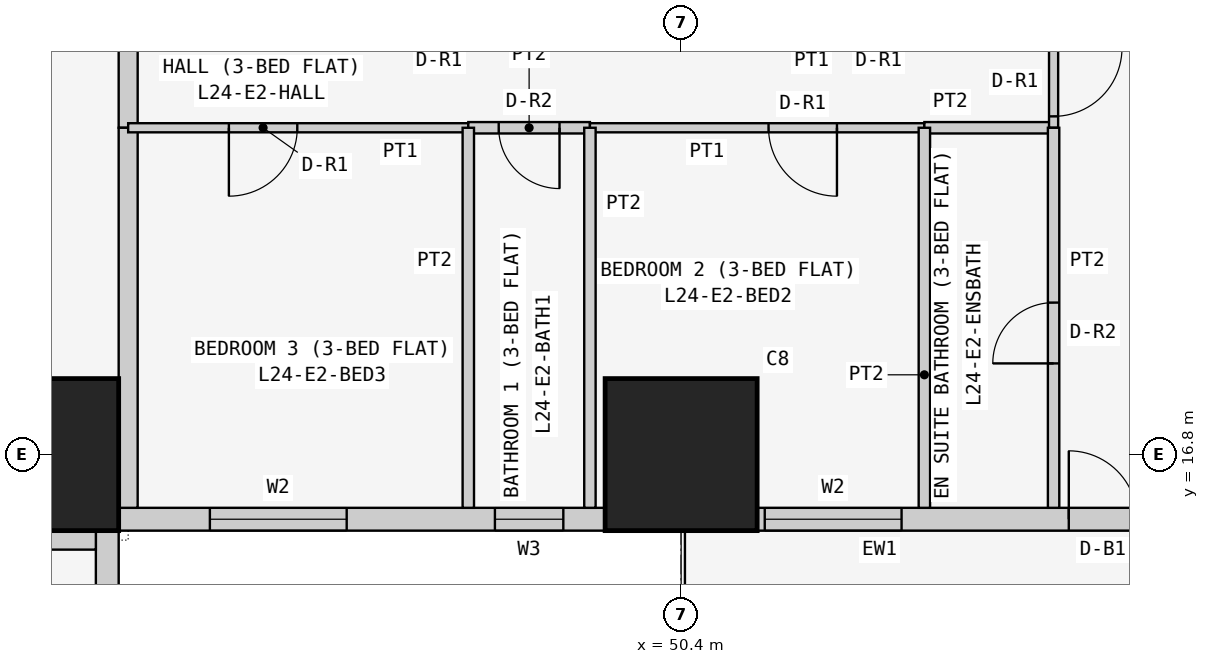
"""IFC4 building model, lengths in metres.
Left out: names, types, materials, properties, quantities, classifications, styles, units other than length and angle.
Written with IfcOpenShell. Run it as: python <this file> out.ifc"""

import sys

from ifc_helpers import new_model, si_unit, direction, frame, frame_2d, origin, origin_2d, place, context, subcontext, project, spatial, rectangle, extrude, element, fill, save


model = new_model("IFC4")
c1 = context("Model", 3, precision=1e-05, world=origin(), true_north=direction((0.0, 1.0)))
c2 = subcontext(c1, "Body", "Model", "MODEL_VIEW")
j1 = project(units=[si_unit("LENGTHUNIT", "METRE"), si_unit("PLANEANGLEUNIT", "RADIAN")], contexts=[c1])
p1 = place(None, origin())
s1 = spatial("IfcSite", under=j1, at=p1, CompositionType="ELEMENT")
p2 = place(p1, origin())
s2 = spatial("IfcBuilding", under=s1, at=p2, CompositionType="ELEMENT")
p3 = place(p2, frame((0.0, 0.0, 95.7)))
s3 = spatial("IfcBuildingStorey", under=s2, at=p3, CompositionType="ELEMENT", Elevation=95.7)
for number, where, z_axis, x_axis in (
    (1, (42.0, 16.8, 0.0), (0.0, 0.0, 1.0), (1.0, 0.0, 0.0)),
    (2, (50.4, 16.8, 0.0), (0.0, 0.0, 1.0), (1.0, 0.0, 0.0)),
):
    element("IfcColumn", number, at=place(p3, frame(where, z_axis=z_axis, x_axis=x_axis)), inside=s3, PredefinedType="COLUMN", context=c2, shape_type="SweptSolid", body=[
        extrude(rectangle(XDim=2.0, YDim=2.0, at=origin_2d()), origin(), (0.0, 0.0, 1.0), 3.6),
    ])
p4 = place(p3, frame((42.85, 0.4, 0.0), z_axis=(0.0, 0.0, 1.0), x_axis=(0.0, 1.0, 0.0)))
e3 = element("IfcWall", 3, at=p4, inside=s3, PredefinedType="SOLIDWALL", context=c2, shape_type="SweptSolid", body=[
    extrude(rectangle(XDim=15.7, YDim=0.3, at=frame_2d((7.85, 0.0))), origin(), (0.0, 0.0, 1.0), 3.45),
])
p5 = place(p4, frame((12.4, 0.0, 0.9)))
e4 = element("IfcOpeningElement", 4, at=p5, cuts=e3, PredefinedType="OPENING", context=c2, shape_type="SweptSolid", body=[
    extrude(rectangle(XDim=1.8, YDim=1.5, at=frame_2d((0.9, 0.75))), frame((0.0, 0.16, 0.0), z_axis=(0.0, -1.0, 0.0), x_axis=(1.0, 0.0, 0.0)), (0.0, 0.0, 1.0), 0.32),
])
p6 = place(p4, frame((9.55, 0.0, 1.5)))
e5 = element("IfcOpeningElement", 5, at=p6, cuts=e3, PredefinedType="OPENING", context=c2, shape_type="SweptSolid", body=[
    extrude(rectangle(XDim=0.9, YDim=0.7, at=frame_2d((0.45, 0.35))), frame((0.0, 0.16, 0.0), z_axis=(0.0, -1.0, 0.0), x_axis=(1.0, 0.0, 0.0)), (0.0, 0.0, 1.0), 0.32),
])
p7 = place(p4, frame((5.1, 0.0, 0.9)))
e6 = element("IfcOpeningElement", 6, at=p7, cuts=e3, PredefinedType="OPENING", context=c2, shape_type="SweptSolid", body=[
    extrude(rectangle(XDim=1.8, YDim=1.5, at=frame_2d((0.9, 0.75))), frame((0.0, 0.16, 0.0), z_axis=(0.0, -1.0, 0.0), x_axis=(1.0, 0.0, 0.0)), (0.0, 0.0, 1.0), 0.32),
])
p8 = place(p4, frame((2.0, 0.0, 0.0)))
e7 = element("IfcOpeningElement", 7, at=p8, cuts=e3, PredefinedType="OPENING", context=c2, shape_type="SweptSolid", body=[
    extrude(rectangle(XDim=0.9, YDim=2.4, at=frame_2d((0.45, 1.2))), frame((0.0, 0.16, 0.0), z_axis=(0.0, -1.0, 0.0), x_axis=(1.0, 0.0, 0.0)), (0.0, 0.0, 1.0), 0.32),
])
p9 = place(p4, frame((0.7, 0.0, 0.9)))
e8 = element("IfcOpeningElement", 8, at=p9, cuts=e3, PredefinedType="OPENING", context=c2, shape_type="SweptSolid", body=[
    extrude(rectangle(XDim=1.2, YDim=1.5, at=frame_2d((0.6, 0.75))), frame((0.0, 0.16, 0.0), z_axis=(0.0, -1.0, 0.0), x_axis=(1.0, 0.0, 0.0)), (0.0, 0.0, 1.0), 0.32),
])
p10 = place(p3, frame((43.0, 15.95, 0.0), z_axis=(0.0, 0.0, 1.0), x_axis=(1.0, 0.0, 0.0)))
e9 = element("IfcWall", 9, at=p10, inside=s3, PredefinedType="SOLIDWALL", context=c2, shape_type="SweptSolid", body=[
    extrude(rectangle(XDim=15.4, YDim=0.3, at=frame_2d((7.7, 0.0))), origin(), (0.0, 0.0, 1.0), 3.45),
])
p11 = place(p10, frame((1.2, 0.0, 0.9)))
e10 = element("IfcOpeningElement", 10, at=p11, cuts=e9, PredefinedType="OPENING", context=c2, shape_type="SweptSolid", body=[
    extrude(rectangle(XDim=1.8, YDim=1.5, at=frame_2d((0.9, 0.75))), frame((0.0, 0.16, 0.0), z_axis=(0.0, -1.0, 0.0), x_axis=(1.0, 0.0, 0.0)), (0.0, 0.0, 1.0), 0.32),
])
p12 = place(p10, frame((4.95, 0.0, 1.5)))
e11 = element("IfcOpeningElement", 11, at=p12, cuts=e9, PredefinedType="OPENING", context=c2, shape_type="SweptSolid", body=[
    extrude(rectangle(XDim=0.9, YDim=0.7, at=frame_2d((0.45, 0.35))), frame((0.0, 0.16, 0.0), z_axis=(0.0, -1.0, 0.0), x_axis=(1.0, 0.0, 0.0)), (0.0, 0.0, 1.0), 0.32),
])
p13 = place(p10, frame((8.5, 0.0, 0.9)))
e12 = element("IfcOpeningElement", 12, at=p13, cuts=e9, PredefinedType="OPENING", context=c2, shape_type="SweptSolid", body=[
    extrude(rectangle(XDim=1.8, YDim=1.5, at=frame_2d((0.9, 0.75))), frame((0.0, 0.16, 0.0), z_axis=(0.0, -1.0, 0.0), x_axis=(1.0, 0.0, 0.0)), (0.0, 0.0, 1.0), 0.32),
])
p14 = place(p10, frame((12.5, 0.0, 0.0)))
e13 = element("IfcOpeningElement", 13, at=p14, cuts=e9, PredefinedType="OPENING", context=c2, shape_type="SweptSolid", body=[
    extrude(rectangle(XDim=0.9, YDim=2.4, at=frame_2d((0.45, 1.2))), frame((0.0, 0.16, 0.0), z_axis=(0.0, -1.0, 0.0), x_axis=(1.0, 0.0, 0.0)), (0.0, 0.0, 1.0), 0.32),
])
p15 = place(p10, frame((13.5, 0.0, 0.9)))
e14 = element("IfcOpeningElement", 14, at=p15, cuts=e9, PredefinedType="OPENING", context=c2, shape_type="SweptSolid", body=[
    extrude(rectangle(XDim=1.2, YDim=1.5, at=frame_2d((0.6, 0.75))), frame((0.0, 0.16, 0.0), z_axis=(0.0, -1.0, 0.0), x_axis=(1.0, 0.0, 0.0)), (0.0, 0.0, 1.0), 0.32),
])
p16 = place(p3, frame((43.125, 22.3, 0.0), z_axis=(0.0, 0.0, 1.0), x_axis=(0.0, -1.0, 0.0)))
e15 = element("IfcWall", 15, at=p16, inside=s3, PredefinedType="PARTITIONING", context=c2, shape_type="SweptSolid", body=[
    extrude(rectangle(XDim=1.2, YDim=0.25, at=frame_2d((0.6, 0.0))), origin(), (0.0, 0.0, 1.0), 3.45),
])
for number, where, z_axis, x_axis in (
    (16, (43.125, 21.1, 0.0), (0.0, 0.0, 1.0), (0.0, -1.0, 0.0)),
    (17, (42.7, 15.675, 0.0), (0.0, 0.0, 1.0), (-1.0, 0.0, 0.0)),
):
    element("IfcWall", number, at=place(p3, frame(where, z_axis=z_axis, x_axis=x_axis)), inside=s3, PredefinedType="PARTITIONING", context=c2, shape_type="SweptSolid", body=[
        extrude(rectangle(XDim=5.0, YDim=0.25, at=frame_2d((2.5, 0.0))), origin(), (0.0, 0.0, 1.0), 3.45),
    ])
p17 = place(p3, frame((47.6, 21.1, 0.0), z_axis=(0.0, 0.0, 1.0), x_axis=(-1.0, 0.0, 0.0)))
e18 = element("IfcWall", 18, at=p17, inside=s3, PredefinedType="PARTITIONING", context=c2, shape_type="SweptSolid", body=[
    extrude(rectangle(XDim=4.475, YDim=0.12, at=frame_2d((2.238, 0.0))), origin(), (0.0, 0.0, 1.0), 3.45),
])
p18 = place(p17, frame((2.25, 0.0, 0.0)))
e19 = element("IfcOpeningElement", 19, at=p18, cuts=e18, PredefinedType="OPENING", context=c2, shape_type="SweptSolid", body=[
    extrude(rectangle(XDim=0.9, YDim=2.1, at=frame_2d((0.45, 1.05))), frame((0.0, 0.07, 0.0), z_axis=(0.0, -1.0, 0.0), x_axis=(1.0, 0.0, 0.0)), (0.0, 0.0, 1.0), 0.14),
])
p19 = place(p3, frame((49.2, 21.1, 0.0), z_axis=(0.0, 0.0, 1.0), x_axis=(-1.0, 0.0, 0.0)))
e20 = element("IfcWall", 20, at=p19, inside=s3, PredefinedType="PARTITIONING", context=c2, shape_type="SweptSolid", body=[
    extrude(rectangle(XDim=1.6, YDim=0.15, at=frame_2d((0.8, 0.0))), origin(), (0.0, 0.0, 1.0), 3.45),
])
p20 = place(p19, frame((0.4, 0.0, 0.0)))
e21 = element("IfcOpeningElement", 21, at=p20, cuts=e20, PredefinedType="OPENING", context=c2, shape_type="SweptSolid", body=[
    extrude(rectangle(XDim=0.8, YDim=2.1, at=frame_2d((0.4, 1.05))), frame((0.0, 0.085, 0.0), z_axis=(0.0, -1.0, 0.0), x_axis=(1.0, 0.0, 0.0)), (0.0, 0.0, 1.0), 0.17),
])
p21 = place(p3, frame((53.6, 21.1, 0.0), z_axis=(0.0, 0.0, 1.0), x_axis=(-1.0, 0.0, 0.0)))
e22 = element("IfcWall", 22, at=p21, inside=s3, PredefinedType="PARTITIONING", context=c2, shape_type="SweptSolid", body=[
    extrude(rectangle(XDim=4.4, YDim=0.12, at=frame_2d((2.2, 0.0))), origin(), (0.0, 0.0, 1.0), 3.45),
])
p22 = place(p21, frame((1.15, 0.0, 0.0)))
e23 = element("IfcOpeningElement", 23, at=p22, cuts=e22, PredefinedType="OPENING", context=c2, shape_type="SweptSolid", body=[
    extrude(rectangle(XDim=0.9, YDim=2.1, at=frame_2d((0.45, 1.05))), frame((0.0, 0.07, 0.0), z_axis=(0.0, -1.0, 0.0), x_axis=(1.0, 0.0, 0.0)), (0.0, 0.0, 1.0), 0.14),
])
p23 = place(p3, frame((55.3, 21.1, 0.0), z_axis=(0.0, 0.0, 1.0), x_axis=(-1.0, 0.0, 0.0)))
e24 = element("IfcWall", 24, at=p23, inside=s3, PredefinedType="PARTITIONING", context=c2, shape_type="SweptSolid", body=[
    extrude(rectangle(XDim=1.7, YDim=0.15, at=frame_2d((0.85, 0.0))), origin(), (0.0, 0.0, 1.0), 3.45),
])
p24 = place(p3, frame((55.3, 22.3, 0.0), z_axis=(0.0, 0.0, 1.0), x_axis=(0.0, -1.0, 0.0)))
e25 = element("IfcWall", 25, at=p24, inside=s3, PredefinedType="PARTITIONING", context=c2, shape_type="SweptSolid", body=[
    extrude(rectangle(XDim=1.2, YDim=0.12, at=frame_2d((0.6, 0.0))), origin(), (0.0, 0.0, 1.0), 3.45),
])
p25 = place(p24, frame((0.15, 0.0, 0.0)))
e26 = element("IfcOpeningElement", 26, at=p25, cuts=e25, PredefinedType="OPENING", context=c2, shape_type="SweptSolid", body=[
    extrude(rectangle(XDim=0.9, YDim=2.1, at=frame_2d((0.45, 1.05))), frame((0.0, 0.07, 0.0), z_axis=(0.0, -1.0, 0.0), x_axis=(1.0, 0.0, 0.0)), (0.0, 0.0, 1.0), 0.14),
])
for number, where, z_axis, x_axis in (
    (27, (47.6, 21.1, 0.0), (0.0, 0.0, 1.0), (0.0, -1.0, 0.0)),
    (28, (49.2, 21.1, 0.0), (0.0, 0.0, 1.0), (0.0, -1.0, 0.0)),
    (29, (53.6, 21.1, 0.0), (0.0, 0.0, 1.0), (0.0, -1.0, 0.0)),
):
    element("IfcWall", number, at=place(p3, frame(where, z_axis=z_axis, x_axis=x_axis)), inside=s3, PredefinedType="PARTITIONING", context=c2, shape_type="SweptSolid", body=[
        extrude(rectangle(XDim=5.0, YDim=0.15, at=frame_2d((2.5, 0.0))), origin(), (0.0, 0.0, 1.0), 3.45),
    ])
p26 = place(p3, frame((55.3, 21.1, 0.0), z_axis=(0.0, 0.0, 1.0), x_axis=(0.0, -1.0, 0.0)))
e30 = element("IfcWall", 30, at=p26, inside=s3, PredefinedType="PARTITIONING", context=c2, shape_type="SweptSolid", body=[
    extrude(rectangle(XDim=5.0, YDim=0.15, at=frame_2d((2.5, 0.0))), origin(), (0.0, 0.0, 1.0), 3.45),
])
p27 = place(p26, frame((2.3, 0.0, 0.0)))
e31 = element("IfcOpeningElement", 31, at=p27, cuts=e30, PredefinedType="OPENING", context=c2, shape_type="SweptSolid", body=[
    extrude(rectangle(XDim=0.8, YDim=2.1, at=frame_2d((0.4, 1.05))), frame((0.0, 0.085, 0.0), z_axis=(0.0, -1.0, 0.0), x_axis=(1.0, 0.0, 0.0)), (0.0, 0.0, 1.0), 0.17),
])
p28 = place(p11, origin())
e32 = element("IfcWindow", 32, at=p28, inside=s3, PartitioningType="SINGLE_PANEL", PredefinedType="WINDOW", context=c2, shape_type="SweptSolid", body=[
    extrude(rectangle(XDim=1.8, YDim=1.5, at=frame_2d((0.9, 0.75))), frame((0.0, 0.03, 0.0), z_axis=(0.0, -1.0, 0.0), x_axis=(1.0, 0.0, 0.0)), (0.0, 0.0, 1.0), 0.06),
])
fill(e10, e32)
p29 = place(p12, origin())
e33 = element("IfcWindow", 33, at=p29, inside=s3, PartitioningType="SINGLE_PANEL", PredefinedType="WINDOW", context=c2, shape_type="SweptSolid", body=[
    extrude(rectangle(XDim=0.9, YDim=0.7, at=frame_2d((0.45, 0.35))), frame((0.0, 0.03, 0.0), z_axis=(0.0, -1.0, 0.0), x_axis=(1.0, 0.0, 0.0)), (0.0, 0.0, 1.0), 0.06),
])
fill(e11, e33)
p30 = place(p13, origin())
e34 = element("IfcWindow", 34, at=p30, inside=s3, PartitioningType="SINGLE_PANEL", PredefinedType="WINDOW", context=c2, shape_type="SweptSolid", body=[
    extrude(rectangle(XDim=1.8, YDim=1.5, at=frame_2d((0.9, 0.75))), frame((0.0, 0.03, 0.0), z_axis=(0.0, -1.0, 0.0), x_axis=(1.0, 0.0, 0.0)), (0.0, 0.0, 1.0), 0.06),
])
fill(e12, e34)
p31 = place(p14, origin())
e35 = element("IfcDoor", 35, at=p31, inside=s3, OperationType="SINGLE_SWING_LEFT", PredefinedType="DOOR", context=c2, shape_type="SweptSolid", body=[
    extrude(rectangle(XDim=0.9, YDim=2.4, at=frame_2d((0.45, 1.2))), frame((0.0, 0.025, 0.0), z_axis=(0.0, -1.0, 0.0), x_axis=(1.0, 0.0, 0.0)), (0.0, 0.0, 1.0), 0.05),
])
fill(e13, e35)
p32 = place(p18, origin())
e36 = element("IfcDoor", 36, at=p32, inside=s3, OperationType="SINGLE_SWING_RIGHT", PredefinedType="DOOR", context=c2, shape_type="SweptSolid", body=[
    extrude(rectangle(XDim=0.9, YDim=2.1, at=frame_2d((0.45, 1.05))), frame((0.0, 0.025, 0.0), z_axis=(0.0, -1.0, 0.0), x_axis=(1.0, 0.0, 0.0)), (0.0, 0.0, 1.0), 0.05),
])
fill(e19, e36)
p33 = place(p20, origin())
e37 = element("IfcDoor", 37, at=p33, inside=s3, OperationType="SINGLE_SWING_LEFT", PredefinedType="DOOR", context=c2, shape_type="SweptSolid", body=[
    extrude(rectangle(XDim=0.8, YDim=2.1, at=frame_2d((0.4, 1.05))), frame((0.0, 0.025, 0.0), z_axis=(0.0, -1.0, 0.0), x_axis=(1.0, 0.0, 0.0)), (0.0, 0.0, 1.0), 0.05),
])
fill(e21, e37)
p34 = place(p22, origin())
e38 = element("IfcDoor", 38, at=p34, inside=s3, OperationType="SINGLE_SWING_LEFT", PredefinedType="DOOR", context=c2, shape_type="SweptSolid", body=[
    extrude(rectangle(XDim=0.9, YDim=2.1, at=frame_2d((0.45, 1.05))), frame((0.0, 0.025, 0.0), z_axis=(0.0, -1.0, 0.0), x_axis=(1.0, 0.0, 0.0)), (0.0, 0.0, 1.0), 0.05),
])
fill(e23, e38)
p35 = place(p25, origin())
e39 = element("IfcDoor", 39, at=p35, inside=s3, OperationType="SINGLE_SWING_LEFT", PredefinedType="DOOR", context=c2, shape_type="SweptSolid", body=[
    extrude(rectangle(XDim=0.9, YDim=2.1, at=frame_2d((0.45, 1.05))), frame((0.0, 0.025, 0.0), z_axis=(0.0, -1.0, 0.0), x_axis=(1.0, 0.0, 0.0)), (0.0, 0.0, 1.0), 0.05),
])
fill(e26, e39)
p36 = place(p27, frame((0.8, 0.0, 0.0), z_axis=(0.0, 0.0, 1.0), x_axis=(-1.0, 0.0, 0.0)))
e40 = element("IfcDoor", 40, at=p36, inside=s3, OperationType="SINGLE_SWING_LEFT", PredefinedType="DOOR", context=c2, shape_type="SweptSolid", body=[
    extrude(rectangle(XDim=0.8, YDim=2.1, at=frame_2d((0.4, 1.05))), frame((0.0, 0.025, 0.0), z_axis=(0.0, -1.0, 0.0), x_axis=(1.0, 0.0, 0.0)), (0.0, 0.0, 1.0), 0.05),
])
fill(e31, e40)
save(model, sys.argv[1])
